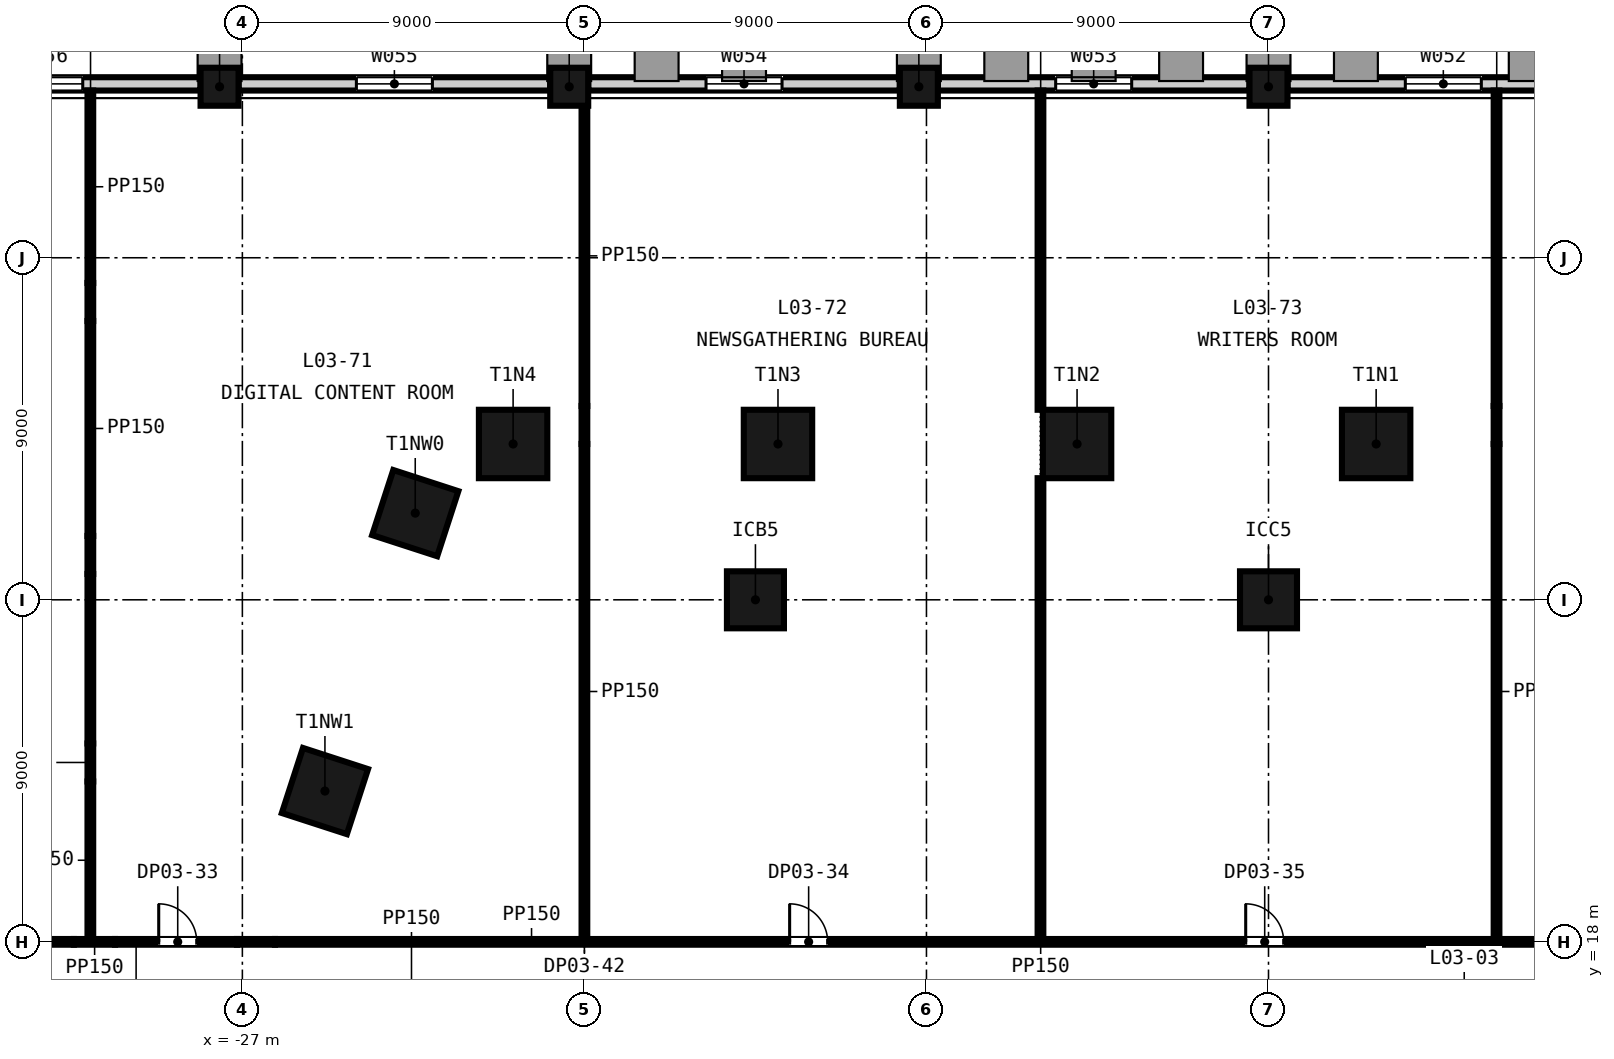
"""IFC4 building model, lengths in metres.
Left out: names, types, materials, properties, quantities, classifications, styles, units other than length and angle.
Written with IfcOpenShell. Run it as: python <this file> out.ifc"""

import sys

from ifc_helpers import new_model, si_unit, direction, frame, frame_2d, origin, origin_2d, place, context, subcontext, project, spatial, rectangle, extrude, element, fill, save


model = new_model("IFC4")
c1 = context("Model", 3, precision=1e-05, world=origin(), true_north=direction((0.0, 1.0)))
c2 = subcontext(c1, "Body", "Model", "MODEL_VIEW")
j1 = project(units=[si_unit("LENGTHUNIT", "METRE"), si_unit("PLANEANGLEUNIT", "RADIAN")], contexts=[c1])
p1 = place(None, origin())
s1 = spatial("IfcSite", under=j1, at=p1, CompositionType="ELEMENT")
p2 = place(p1, origin())
s2 = spatial("IfcBuilding", under=s1, at=p2, CompositionType="ELEMENT")
p3 = place(p2, frame((0.0, 0.0, 22.5)))
s3 = spatial("IfcBuildingStorey", under=s2, at=p3, CompositionType="ELEMENT", Elevation=22.5)
for number, where, z_axis, x_axis in (
    (1, (2.832, 31.1, -0.3), (0.0, 0.0, 1.0), (-1.0, 0.0, 0.0)),
    (2, (-5.037, 31.1, -0.3), (0.0, 0.0, 1.0), (-1.0, 0.0, 0.0)),
    (3, (-12.907, 31.1, -0.3), (0.0, 0.0, 1.0), (-1.0, 0.0, 0.0)),
    (4, (-19.876, 31.1, -0.3), (0.0, 0.0, 1.0), (-1.0, 0.0, 0.0)),
    (5, (-22.451, 29.281, -0.3), (0.0, 0.0, 1.0), (-0.309, -0.951, 0.0)),
    (6, (-24.827, 21.968, -0.3), (0.0, 0.0, 1.0), (-0.309, -0.951, 0.0)),
):
    element("IfcColumn", number, at=place(p3, frame(where, z_axis=z_axis, x_axis=x_axis)), inside=s3, PredefinedType="COLUMN", context=c2, shape_type="SweptSolid", body=[
        extrude(rectangle(XDim=1.8, YDim=1.8, at=origin_2d()), origin(), (0.0, 0.0, 1.0), 4.5),
    ])
for number, where, z_axis, x_axis in (
    (7, (-13.5, 27.0, -0.3), (0.0, 0.0, 1.0), (1.0, 0.0, 0.0)),
    (8, (0.0, 27.0, -0.3), (0.0, 0.0, 1.0), (1.0, 0.0, 0.0)),
):
    element("IfcColumn", number, at=place(p3, frame(where, z_axis=z_axis, x_axis=x_axis)), inside=s3, PredefinedType="COLUMN", context=c2, shape_type="SweptSolid", body=[
        extrude(rectangle(XDim=1.5, YDim=1.5, at=origin_2d()), origin(), (0.0, 0.0, 1.0), 4.5),
    ])
for number, where, z_axis, x_axis in (
    (9, (0.0, 40.5, -0.3), (0.0, 0.0, 1.0), (-1.0, 0.0, 0.0)),
    (10, (-9.2, 40.5, -0.3), (0.0, 0.0, 1.0), (-1.0, 0.0, 0.0)),
    (11, (-18.4, 40.5, -0.3), (0.0, 0.0, 1.0), (-1.0, 0.0, 0.0)),
    (12, (-27.6, 40.5, -0.3), (0.0, 0.0, 1.0), (-1.0, 0.0, 0.0)),
):
    element("IfcColumn", number, at=place(p3, frame(where, z_axis=z_axis, x_axis=x_axis)), inside=s3, PredefinedType="COLUMN", context=c2, shape_type="SweptSolid", body=[
        extrude(rectangle(XDim=1.0, YDim=1.0, at=origin_2d()), origin(), (0.0, 0.0, 1.0), 4.5),
    ])
p4 = place(p3, frame((8.7, 40.575, -0.3), z_axis=(0.0, 0.0, 1.0), x_axis=(-1.0, 0.0, 0.0)))
e13 = element("IfcWall", 13, at=p4, inside=s3, PredefinedType="SOLIDWALL", context=c2, shape_type="SweptSolid", body=[
    extrude(rectangle(XDim=8.2, YDim=0.35, at=frame_2d((4.1, 0.0))), origin(), (0.0, 0.0, 1.0), 3.6),
])
p5 = place(p4, frame((3.1, 0.0, 1.2)))
e14 = element("IfcOpeningElement", 14, at=p5, cuts=e13, PredefinedType="OPENING", context=c2, shape_type="SweptSolid", body=[
    extrude(rectangle(XDim=2.0, YDim=2.35, at=frame_2d((1.0, 1.175))), frame((0.0, 0.185, 0.0), z_axis=(0.0, -1.0, 0.0), x_axis=(1.0, 0.0, 0.0)), (0.0, 0.0, 1.0), 0.37),
])
p6 = place(p3, frame((-0.5, 40.575, -0.3), z_axis=(0.0, 0.0, 1.0), x_axis=(-1.0, 0.0, 0.0)))
e15 = element("IfcWall", 15, at=p6, inside=s3, PredefinedType="SOLIDWALL", context=c2, shape_type="SweptSolid", body=[
    extrude(rectangle(XDim=8.2, YDim=0.35, at=frame_2d((4.1, 0.0))), origin(), (0.0, 0.0, 1.0), 3.6),
])
p7 = place(p6, frame((3.1, 0.0, 1.2)))
e16 = element("IfcOpeningElement", 16, at=p7, cuts=e15, PredefinedType="OPENING", context=c2, shape_type="SweptSolid", body=[
    extrude(rectangle(XDim=2.0, YDim=2.35, at=frame_2d((1.0, 1.175))), frame((0.0, 0.185, 0.0), z_axis=(0.0, -1.0, 0.0), x_axis=(1.0, 0.0, 0.0)), (0.0, 0.0, 1.0), 0.37),
])
p8 = place(p3, frame((-9.7, 40.575, -0.3), z_axis=(0.0, 0.0, 1.0), x_axis=(-1.0, 0.0, 0.0)))
e17 = element("IfcWall", 17, at=p8, inside=s3, PredefinedType="SOLIDWALL", context=c2, shape_type="SweptSolid", body=[
    extrude(rectangle(XDim=8.2, YDim=0.35, at=frame_2d((4.1, 0.0))), origin(), (0.0, 0.0, 1.0), 3.6),
])
p9 = place(p8, frame((3.1, 0.0, 1.2)))
e18 = element("IfcOpeningElement", 18, at=p9, cuts=e17, PredefinedType="OPENING", context=c2, shape_type="SweptSolid", body=[
    extrude(rectangle(XDim=2.0, YDim=2.35, at=frame_2d((1.0, 1.175))), frame((0.0, 0.185, 0.0), z_axis=(0.0, -1.0, 0.0), x_axis=(1.0, 0.0, 0.0)), (0.0, 0.0, 1.0), 0.37),
])
p10 = place(p3, frame((-18.9, 40.575, -0.3), z_axis=(0.0, 0.0, 1.0), x_axis=(-1.0, 0.0, 0.0)))
e19 = element("IfcWall", 19, at=p10, inside=s3, PredefinedType="SOLIDWALL", context=c2, shape_type="SweptSolid", body=[
    extrude(rectangle(XDim=8.2, YDim=0.35, at=frame_2d((4.1, 0.0))), origin(), (0.0, 0.0, 1.0), 3.6),
])
p11 = place(p10, frame((3.1, 0.0, 1.2)))
e20 = element("IfcOpeningElement", 20, at=p11, cuts=e19, PredefinedType="OPENING", context=c2, shape_type="SweptSolid", body=[
    extrude(rectangle(XDim=2.0, YDim=2.35, at=frame_2d((1.0, 1.175))), frame((0.0, 0.185, 0.0), z_axis=(0.0, -1.0, 0.0), x_axis=(1.0, 0.0, 0.0)), (0.0, 0.0, 1.0), 0.37),
])
p12 = place(p3, frame((-28.1, 40.575, -0.3), z_axis=(0.0, 0.0, 1.0), x_axis=(-1.0, 0.0, 0.0)))
e21 = element("IfcWall", 21, at=p12, inside=s3, PredefinedType="SOLIDWALL", context=c2, shape_type="SweptSolid", body=[
    extrude(rectangle(XDim=8.2, YDim=0.35, at=frame_2d((4.1, 0.0))), origin(), (0.0, 0.0, 1.0), 3.6),
])
p13 = place(p12, frame((3.1, 0.0, 1.2)))
e22 = element("IfcOpeningElement", 22, at=p13, cuts=e21, PredefinedType="OPENING", context=c2, shape_type="SweptSolid", body=[
    extrude(rectangle(XDim=2.0, YDim=2.35, at=frame_2d((1.0, 1.175))), frame((0.0, 0.185, 0.0), z_axis=(0.0, -1.0, 0.0), x_axis=(1.0, 0.0, 0.0)), (0.0, 0.0, 1.0), 0.37),
])
p14 = place(p3, frame((-39.241, 18.0, 0.0), z_axis=(0.0, 0.0, 1.0), x_axis=(1.0, 0.0, 0.0)))
e23 = element("IfcWall", 23, at=p14, inside=s3, PredefinedType="PARTITIONING", context=c2, shape_type="SweptSolid", body=[
    extrude(rectangle(XDim=7.807, YDim=0.15, at=frame_2d((3.903, 0.0))), origin(), (0.0, 0.0, 1.0), 4.2),
])
p15 = place(p14, frame((3.4, 0.0, 0.0)))
e24 = element("IfcOpeningElement", 24, at=p15, cuts=e23, PredefinedType="OPENING", context=c2, shape_type="SweptSolid", body=[
    extrude(rectangle(XDim=1.0, YDim=2.1, at=frame_2d((0.5, 1.05))), frame((0.0, 0.085, 0.0), z_axis=(0.0, -1.0, 0.0), x_axis=(1.0, 0.0, 0.0)), (0.0, 0.0, 1.0), 0.17),
])
p16 = place(p3, frame((-31.434, 18.0, 0.0), z_axis=(0.0, 0.0, 1.0), x_axis=(1.0, 0.0, 0.0)))
e25 = element("IfcWall", 25, at=p16, inside=s3, PredefinedType="PARTITIONING", context=c2, shape_type="SweptSolid", body=[
    extrude(rectangle(XDim=1.083, YDim=0.15, at=frame_2d((0.542, 0.0))), origin(), (0.0, 0.0, 1.0), 3.111),
])
p17 = place(p3, frame((-30.351, 18.0, 0.0), z_axis=(0.0, 0.0, 1.0), x_axis=(1.0, 0.0, 0.0)))
e26 = element("IfcWall", 26, at=p17, inside=s3, PredefinedType="PARTITIONING", context=c2, shape_type="SweptSolid", body=[
    extrude(rectangle(XDim=3.209, YDim=0.15, at=frame_2d((1.604, 0.0))), origin(), (0.0, 0.0, 1.0), 4.2),
])
p18 = place(p17, frame((1.15, 0.0, 0.0)))
e27 = element("IfcOpeningElement", 27, at=p18, cuts=e26, PredefinedType="OPENING", context=c2, shape_type="SweptSolid", body=[
    extrude(rectangle(XDim=1.0, YDim=2.1, at=frame_2d((0.5, 1.05))), frame((0.0, 0.085, 0.0), z_axis=(0.0, -1.0, 0.0), x_axis=(1.0, 0.0, 0.0)), (0.0, 0.0, 1.0), 0.17),
])
p19 = place(p3, frame((-27.142, 18.0, 0.0), z_axis=(0.0, 0.0, 1.0), x_axis=(1.0, 0.0, 0.0)))
e28 = element("IfcWall", 28, at=p19, inside=s3, PredefinedType="PARTITIONING", context=c2, shape_type="SweptSolid", body=[
    extrude(rectangle(XDim=1.0, YDim=0.15, at=frame_2d((0.5, 0.0))), origin(), (0.0, 0.0, 1.0), 3.2),
])
p20 = place(p3, frame((-26.142, 18.0, 0.0), z_axis=(0.0, 0.0, 1.0), x_axis=(1.0, 0.0, 0.0)))
e29 = element("IfcWall", 29, at=p20, inside=s3, PredefinedType="PARTITIONING", context=c2, shape_type="SweptSolid", body=[
    extrude(rectangle(XDim=44.067, YDim=0.15, at=frame_2d((22.034, 0.0))), origin(), (0.0, 0.0, 1.0), 4.2),
])
p21 = place(p20, frame((13.542, 0.0, 0.0)))
e30 = element("IfcOpeningElement", 30, at=p21, cuts=e29, PredefinedType="OPENING", context=c2, shape_type="SweptSolid", body=[
    extrude(rectangle(XDim=1.0, YDim=2.1, at=frame_2d((0.5, 1.05))), frame((0.0, 0.085, 0.0), z_axis=(0.0, -1.0, 0.0), x_axis=(1.0, 0.0, 0.0)), (0.0, 0.0, 1.0), 0.17),
])
p22 = place(p20, frame((25.542, 0.0, 0.0)))
e31 = element("IfcOpeningElement", 31, at=p22, cuts=e29, PredefinedType="OPENING", context=c2, shape_type="SweptSolid", body=[
    extrude(rectangle(XDim=1.0, YDim=2.1, at=frame_2d((0.5, 1.05))), frame((0.0, 0.085, 0.0), z_axis=(0.0, -1.0, 0.0), x_axis=(1.0, 0.0, 0.0)), (0.0, 0.0, 1.0), 0.17),
])
p23 = place(p20, frame((37.542, 0.0, 0.0)))
e32 = element("IfcOpeningElement", 32, at=p23, cuts=e29, PredefinedType="OPENING", context=c2, shape_type="SweptSolid", body=[
    extrude(rectangle(XDim=1.0, YDim=2.1, at=frame_2d((0.5, 1.05))), frame((0.0, 0.085, 0.0), z_axis=(0.0, -1.0, 0.0), x_axis=(1.0, 0.0, 0.0)), (0.0, 0.0, 1.0), 0.17),
])
p24 = place(p3, frame((-31.0, 18.075, 0.0), z_axis=(0.0, 0.0, 1.0), x_axis=(0.0, 1.0, 0.0)))
e33 = element("IfcWall", 33, at=p24, inside=s3, PredefinedType="PARTITIONING", context=c2, shape_type="SweptSolid", body=[
    extrude(rectangle(XDim=4.145, YDim=0.15, at=frame_2d((2.073, 0.0))), origin(), (0.0, 0.0, 1.0), 4.2),
])
p25 = place(p3, frame((-31.0, 22.22, 0.0), z_axis=(0.0, 0.0, 1.0), x_axis=(0.0, 1.0, 0.0)))
e34 = element("IfcWall", 34, at=p25, inside=s3, PredefinedType="PARTITIONING", context=c2, shape_type="SweptSolid", body=[
    extrude(rectangle(XDim=1.0, YDim=0.15, at=frame_2d((0.5, 0.0))), origin(), (0.0, 0.0, 1.0), 3.111),
])
p26 = place(p3, frame((-31.0, 23.22, 0.0), z_axis=(0.0, 0.0, 1.0), x_axis=(0.0, 1.0, 0.0)))
e35 = element("IfcWall", 35, at=p26, inside=s3, PredefinedType="PARTITIONING", context=c2, shape_type="SweptSolid", body=[
    extrude(rectangle(XDim=4.46, YDim=0.15, at=frame_2d((2.23, 0.0))), origin(), (0.0, 0.0, 1.0), 4.2),
])
p27 = place(p3, frame((-31.0, 27.68, 0.0), z_axis=(0.0, 0.0, 1.0), x_axis=(0.0, 1.0, 0.0)))
e36 = element("IfcWall", 36, at=p27, inside=s3, PredefinedType="PARTITIONING", context=c2, shape_type="SweptSolid", body=[
    extrude(rectangle(XDim=1.0, YDim=0.15, at=frame_2d((0.5, 0.0))), origin(), (0.0, 0.0, 1.0), 3.111),
])
p28 = place(p3, frame((-31.0, 28.68, 0.0), z_axis=(0.0, 0.0, 1.0), x_axis=(0.0, 1.0, 0.0)))
e37 = element("IfcWall", 37, at=p28, inside=s3, PredefinedType="PARTITIONING", context=c2, shape_type="SweptSolid", body=[
    extrude(rectangle(XDim=5.656, YDim=0.15, at=frame_2d((2.828, 0.0))), origin(), (0.0, 0.0, 1.0), 4.2),
])
p29 = place(p3, frame((-31.0, 34.336, 0.0), z_axis=(0.0, 0.0, 1.0), x_axis=(0.0, 1.0, 0.0)))
e38 = element("IfcWall", 38, at=p29, inside=s3, PredefinedType="PARTITIONING", context=c2, shape_type="SweptSolid", body=[
    extrude(rectangle(XDim=1.0, YDim=0.15, at=frame_2d((0.5, 0.0))), origin(), (0.0, 0.0, 1.0), 3.298),
])
p30 = place(p3, frame((-31.0, 35.336, 0.0), z_axis=(0.0, 0.0, 1.0), x_axis=(0.0, 1.0, 0.0)))
e39 = element("IfcWall", 39, at=p30, inside=s3, PredefinedType="PARTITIONING", context=c2, shape_type="SweptSolid", body=[
    extrude(rectangle(XDim=5.064, YDim=0.15, at=frame_2d((2.532, 0.0))), origin(), (0.0, 0.0, 1.0), 4.2),
])
p31 = place(p3, frame((-18.0, 18.075, 0.0), z_axis=(0.0, 0.0, 1.0), x_axis=(0.0, 1.0, 0.0)))
e40 = element("IfcWall", 40, at=p31, inside=s3, PredefinedType="PARTITIONING", context=c2, shape_type="SweptSolid", body=[
    extrude(rectangle(XDim=13.025, YDim=0.15, at=frame_2d((6.513, 0.0))), origin(), (0.0, 0.0, 1.0), 4.2),
])
p32 = place(p3, frame((-18.0, 31.1, 0.0), z_axis=(0.0, 0.0, 1.0), x_axis=(0.0, 1.0, 0.0)))
e41 = element("IfcWall", 41, at=p32, inside=s3, PredefinedType="PARTITIONING", context=c2, shape_type="SweptSolid", body=[
    extrude(rectangle(XDim=1.0, YDim=0.15, at=frame_2d((0.5, 0.0))), origin(), (0.0, 0.0, 1.0), 3.2),
])
p33 = place(p3, frame((-18.0, 32.1, 0.0), z_axis=(0.0, 0.0, 1.0), x_axis=(0.0, 1.0, 0.0)))
e42 = element("IfcWall", 42, at=p33, inside=s3, PredefinedType="PARTITIONING", context=c2, shape_type="SweptSolid", body=[
    extrude(rectangle(XDim=7.9, YDim=0.15, at=frame_2d((3.95, 0.0))), origin(), (0.0, 0.0, 1.0), 4.2),
])
p34 = place(p3, frame((-6.0, 18.075, 0.0), z_axis=(0.0, 0.0, 1.0), x_axis=(0.0, 1.0, 0.0)))
e43 = element("IfcWall", 43, at=p34, inside=s3, PredefinedType="PARTITIONING", context=c2, shape_type="SweptSolid", body=[
    extrude(rectangle(XDim=12.125, YDim=0.15, at=frame_2d((6.062, 0.0))), origin(), (0.0, 0.0, 1.0), 4.2),
])
p35 = place(p3, frame((-6.0, 32.0, 0.0), z_axis=(0.0, 0.0, 1.0), x_axis=(0.0, 1.0, 0.0)))
e44 = element("IfcWall", 44, at=p35, inside=s3, PredefinedType="PARTITIONING", context=c2, shape_type="SweptSolid", body=[
    extrude(rectangle(XDim=8.4, YDim=0.15, at=frame_2d((4.2, 0.0))), origin(), (0.0, 0.0, 1.0), 4.2),
])
p36 = place(p3, frame((6.0, 18.075, 0.0), z_axis=(0.0, 0.0, 1.0), x_axis=(0.0, 1.0, 0.0)))
e45 = element("IfcWall", 45, at=p36, inside=s3, PredefinedType="PARTITIONING", context=c2, shape_type="SweptSolid", body=[
    extrude(rectangle(XDim=13.025, YDim=0.15, at=frame_2d((6.513, 0.0))), origin(), (0.0, 0.0, 1.0), 4.2),
])
p37 = place(p3, frame((6.0, 31.1, 0.0), z_axis=(0.0, 0.0, 1.0), x_axis=(0.0, 1.0, 0.0)))
e46 = element("IfcWall", 46, at=p37, inside=s3, PredefinedType="PARTITIONING", context=c2, shape_type="SweptSolid", body=[
    extrude(rectangle(XDim=1.0, YDim=0.15, at=frame_2d((0.5, 0.0))), origin(), (0.0, 0.0, 1.0), 3.2),
])
p38 = place(p3, frame((6.0, 32.1, 0.0), z_axis=(0.0, 0.0, 1.0), x_axis=(0.0, 1.0, 0.0)))
e47 = element("IfcWall", 47, at=p38, inside=s3, PredefinedType="PARTITIONING", context=c2, shape_type="SweptSolid", body=[
    extrude(rectangle(XDim=8.3, YDim=0.15, at=frame_2d((4.15, 0.0))), origin(), (0.0, 0.0, 1.0), 4.2),
])
p39 = place(p5, origin())
e48 = element("IfcWindow", 48, at=p39, inside=s3, PartitioningType="SINGLE_PANEL", PredefinedType="WINDOW", context=c2, shape_type="SweptSolid", body=[
    extrude(rectangle(XDim=2.0, YDim=2.35, at=frame_2d((1.0, 1.175))), frame((0.0, 0.03, 0.0), z_axis=(0.0, -1.0, 0.0), x_axis=(1.0, 0.0, 0.0)), (0.0, 0.0, 1.0), 0.06),
])
fill(e14, e48)
p40 = place(p7, origin())
e49 = element("IfcWindow", 49, at=p40, inside=s3, PartitioningType="SINGLE_PANEL", PredefinedType="WINDOW", context=c2, shape_type="SweptSolid", body=[
    extrude(rectangle(XDim=2.0, YDim=2.35, at=frame_2d((1.0, 1.175))), frame((0.0, 0.03, 0.0), z_axis=(0.0, -1.0, 0.0), x_axis=(1.0, 0.0, 0.0)), (0.0, 0.0, 1.0), 0.06),
])
fill(e16, e49)
p41 = place(p9, origin())
e50 = element("IfcWindow", 50, at=p41, inside=s3, PartitioningType="SINGLE_PANEL", PredefinedType="WINDOW", context=c2, shape_type="SweptSolid", body=[
    extrude(rectangle(XDim=2.0, YDim=2.35, at=frame_2d((1.0, 1.175))), frame((0.0, 0.03, 0.0), z_axis=(0.0, -1.0, 0.0), x_axis=(1.0, 0.0, 0.0)), (0.0, 0.0, 1.0), 0.06),
])
fill(e18, e50)
p42 = place(p11, origin())
e51 = element("IfcWindow", 51, at=p42, inside=s3, PartitioningType="SINGLE_PANEL", PredefinedType="WINDOW", context=c2, shape_type="SweptSolid", body=[
    extrude(rectangle(XDim=2.0, YDim=2.35, at=frame_2d((1.0, 1.175))), frame((0.0, 0.03, 0.0), z_axis=(0.0, -1.0, 0.0), x_axis=(1.0, 0.0, 0.0)), (0.0, 0.0, 1.0), 0.06),
])
fill(e20, e51)
p43 = place(p13, origin())
e52 = element("IfcWindow", 52, at=p43, inside=s3, PartitioningType="SINGLE_PANEL", PredefinedType="WINDOW", context=c2, shape_type="SweptSolid", body=[
    extrude(rectangle(XDim=2.0, YDim=2.35, at=frame_2d((1.0, 1.175))), frame((0.0, 0.03, 0.0), z_axis=(0.0, -1.0, 0.0), x_axis=(1.0, 0.0, 0.0)), (0.0, 0.0, 1.0), 0.06),
])
fill(e22, e52)
p44 = place(p18, origin())
e53 = element("IfcDoor", 53, at=p44, inside=s3, OperationType="SINGLE_SWING_LEFT", PredefinedType="DOOR", context=c2, shape_type="SweptSolid", body=[
    extrude(rectangle(XDim=1.0, YDim=2.1, at=frame_2d((0.5, 1.05))), frame((0.0, 0.025, 0.0), z_axis=(0.0, -1.0, 0.0), x_axis=(1.0, 0.0, 0.0)), (0.0, 0.0, 1.0), 0.05),
])
fill(e27, e53)
p45 = place(p21, origin())
e54 = element("IfcDoor", 54, at=p45, inside=s3, OperationType="SINGLE_SWING_LEFT", PredefinedType="DOOR", context=c2, shape_type="SweptSolid", body=[
    extrude(rectangle(XDim=1.0, YDim=2.1, at=frame_2d((0.5, 1.05))), frame((0.0, 0.025, 0.0), z_axis=(0.0, -1.0, 0.0), x_axis=(1.0, 0.0, 0.0)), (0.0, 0.0, 1.0), 0.05),
])
fill(e30, e54)
p46 = place(p22, origin())
e55 = element("IfcDoor", 55, at=p46, inside=s3, OperationType="SINGLE_SWING_LEFT", PredefinedType="DOOR", context=c2, shape_type="SweptSolid", body=[
    extrude(rectangle(XDim=1.0, YDim=2.1, at=frame_2d((0.5, 1.05))), frame((0.0, 0.025, 0.0), z_axis=(0.0, -1.0, 0.0), x_axis=(1.0, 0.0, 0.0)), (0.0, 0.0, 1.0), 0.05),
])
fill(e31, e55)
save(model, sys.argv[1])
